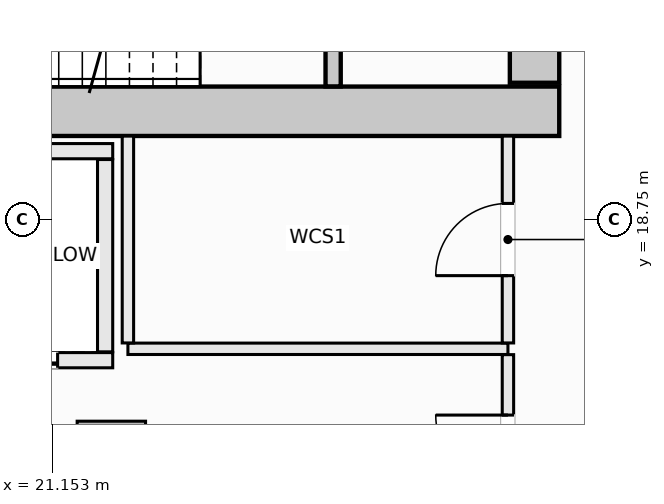
"""IFC4 building model, lengths in metres.
Left out: names, types, materials, properties, quantities, classifications, styles, units other than length and angle.
Written with IfcOpenShell. Run it as: python <this file> out.ifc"""

import sys

from ifc_helpers import new_model, si_unit, direction, frame, frame_2d, origin, origin_2d, place, context, subcontext, project, spatial, rectangle, extrude, element, fill, save


model = new_model("IFC4")
c1 = context("Model", 3, precision=1e-05, world=origin(), true_north=direction((0.0, 1.0)))
c2 = subcontext(c1, "Body", "Model", "MODEL_VIEW")
j1 = project(units=[si_unit("LENGTHUNIT", "METRE"), si_unit("PLANEANGLEUNIT", "RADIAN")], contexts=[c1])
p1 = place(None, origin())
s1 = spatial("IfcSite", under=j1, at=p1, CompositionType="ELEMENT")
p2 = place(p1, origin())
s2 = spatial("IfcBuilding", under=s1, at=p2, CompositionType="ELEMENT")
p3 = place(p2, frame((0.0, 0.0, 166.5)))
s3 = spatial("IfcBuildingStorey", under=s2, at=p3, CompositionType="ELEMENT", Elevation=166.5)
p4 = place(p3, frame((14.175, 20.175, -0.27), z_axis=(0.0, 0.0, 1.0), x_axis=(1.0, 0.0, 0.0)))
e1 = element("IfcWall", 1, at=p4, inside=s3, PredefinedType="SHEAR", context=c2, shape_type="SweptSolid", body=[
    extrude(rectangle(XDim=13.65, YDim=0.65, at=frame_2d((6.825, 0.0))), origin(), (0.0, 0.0, 1.0), 3.4),
])
p5 = place(p3, frame((27.5, 20.55, -0.27), z_axis=(0.0, 0.0, 1.0), x_axis=(0.0, 1.0, 0.0)))
e2 = element("IfcWall", 2, at=p5, inside=s3, PredefinedType="SHEAR", context=c2, shape_type="SweptSolid", body=[
    extrude(rectangle(XDim=1.5, YDim=0.65, at=frame_2d((0.75, 0.0))), origin(), (0.0, 0.0, 1.0), 3.4),
])
p6 = place(p3, frame((21.932, 15.648, -0.27), z_axis=(0.0, 0.0, 1.0), x_axis=(1.0, 0.0, 0.0)))
e3 = element("IfcColumn", 3, at=p6, inside=s3, PredefinedType="COLUMN", context=c2, shape_type="SweptSolid", body=[
    extrude(rectangle(XDim=0.9, YDim=0.9, at=origin_2d()), origin(), (0.0, 0.0, 1.0), 3.4),
])
p7 = place(p3, frame((24.85, 20.502, -0.27), z_axis=(0.0, 0.0, 1.0), x_axis=(0.0, 1.0, 0.0)))
e4 = element("IfcWall", 4, at=p7, inside=s3, PredefinedType="SHEAR", context=c2, shape_type="SweptSolid", body=[
    extrude(rectangle(XDim=3.038, YDim=0.2, at=frame_2d((1.519, 0.0))), origin(), (0.0, 0.0, 1.0), 3.4),
])
p8 = place(p7, frame((0.969, 0.0, 0.27)))
e5 = element("IfcOpeningElement", 5, at=p8, cuts=e4, PredefinedType="OPENING", context=c2, shape_type="SweptSolid", body=[
    extrude(rectangle(XDim=1.1, YDim=2.15, at=frame_2d((0.55, 1.075))), frame((0.0, 0.11, 0.0), z_axis=(0.0, -1.0, 0.0), x_axis=(1.0, 0.0, 0.0)), (0.0, 0.0, 1.0), 0.22),
])
p9 = place(p3, frame((19.4, 19.65, 0.0), z_axis=(0.0, 0.0, 1.0), x_axis=(1.0, 0.0, 0.0)))
e6 = element("IfcWall", 6, at=p9, inside=s3, PredefinedType="SOLIDWALL", context=c2, shape_type="SweptSolid", body=[
    extrude(rectangle(XDim=2.55, YDim=0.2, at=frame_2d((1.275, 0.0))), origin(), (0.0, 0.0, 1.0), 3.13),
])
p10 = place(p3, frame((19.4, 16.9, 0.0), z_axis=(0.0, 0.0, 1.0), x_axis=(1.0, 0.0, 0.0)))
e7 = element("IfcWall", 7, at=p10, inside=s3, PredefinedType="SOLIDWALL", context=c2, shape_type="SweptSolid", body=[
    extrude(rectangle(XDim=2.55, YDim=0.2, at=frame_2d((1.275, 0.0))), origin(), (0.0, 0.0, 1.0), 3.13),
])
p11 = place(p10, frame((0.725, 0.0, 0.0)))
e8 = element("IfcOpeningElement", 8, at=p11, cuts=e7, PredefinedType="OPENING", context=c2, shape_type="SweptSolid", body=[
    extrude(rectangle(XDim=1.1, YDim=2.2, at=frame_2d((0.55, 1.1))), frame((0.0, 0.11, 0.0), z_axis=(0.0, -1.0, 0.0), x_axis=(1.0, 0.0, 0.0)), (0.0, 0.0, 1.0), 0.22),
])
p12 = place(p3, frame((21.85, 17.01, 0.0), z_axis=(0.0, 0.0, 1.0), x_axis=(0.0, 1.0, 0.0)))
e9 = element("IfcWall", 9, at=p12, inside=s3, PredefinedType="SOLIDWALL", context=c2, shape_type="SweptSolid", body=[
    extrude(rectangle(XDim=2.53, YDim=0.2, at=frame_2d((1.265, 0.0))), origin(), (0.0, 0.0, 1.0), 3.13),
])
p13 = place(p3, frame((22.15, 17.05, 0.0), z_axis=(0.0, 0.0, 1.0), x_axis=(1.0, 0.0, 0.0)))
e10 = element("IfcWall", 10, at=p13, inside=s3, PredefinedType="PARTITIONING", context=c2, shape_type="SweptSolid", body=[
    extrude(rectangle(XDim=5.0, YDim=0.15, at=frame_2d((2.5, 0.0))), origin(), (0.0, 0.0, 1.0), 3.13),
])
p14 = place(p3, frame((22.15, 17.127, 0.0), z_axis=(0.0, 0.0, 1.0), x_axis=(0.0, 1.0, 0.0)))
e11 = element("IfcWall", 11, at=p14, inside=s3, PredefinedType="PARTITIONING", context=c2, shape_type="SweptSolid", body=[
    extrude(rectangle(XDim=2.721, YDim=0.15, at=frame_2d((1.36, 0.0))), origin(), (0.0, 0.0, 1.0), 3.13),
])
p15 = place(p3, frame((27.15, 12.056, 0.0), z_axis=(0.0, 0.0, 1.0), x_axis=(0.0, 1.0, 0.0)))
e12 = element("IfcWall", 12, at=p15, inside=s3, PredefinedType="PARTITIONING", context=c2, shape_type="SweptSolid", body=[
    extrude(rectangle(XDim=4.917, YDim=0.15, at=frame_2d((2.458, 0.0))), origin(), (0.0, 0.0, 1.0), 3.13),
])
p16 = place(p15, frame((3.172, 0.0, 0.0)))
e13 = element("IfcOpeningElement", 13, at=p16, cuts=e12, PredefinedType="OPENING", context=c2, shape_type="SweptSolid", body=[
    extrude(rectangle(XDim=0.95, YDim=2.1, at=frame_2d((0.475, 1.05))), frame((0.0, 0.085, 0.0), z_axis=(0.0, -1.0, 0.0), x_axis=(1.0, 0.0, 0.0)), (0.0, 0.0, 1.0), 0.17),
])
p17 = place(p15, frame((1.125, 0.0, 0.0)))
e14 = element("IfcOpeningElement", 14, at=p17, cuts=e12, PredefinedType="OPENING", context=c2, shape_type="SweptSolid", body=[
    extrude(rectangle(XDim=0.95, YDim=2.1, at=frame_2d((0.475, 1.05))), frame((0.0, 0.085, 0.0), z_axis=(0.0, -1.0, 0.0), x_axis=(1.0, 0.0, 0.0)), (0.0, 0.0, 1.0), 0.17),
])
p18 = place(p3, frame((27.15, 17.127, 0.0), z_axis=(0.0, 0.0, 1.0), x_axis=(0.0, 1.0, 0.0)))
e15 = element("IfcWall", 15, at=p18, inside=s3, PredefinedType="PARTITIONING", context=c2, shape_type="SweptSolid", body=[
    extrude(rectangle(XDim=2.721, YDim=0.15, at=frame_2d((1.36, 0.0))), origin(), (0.0, 0.0, 1.0), 3.13),
])
p19 = place(p18, frame((0.885, 0.0, 0.0)))
e16 = element("IfcOpeningElement", 16, at=p19, cuts=e15, PredefinedType="OPENING", context=c2, shape_type="SweptSolid", body=[
    extrude(rectangle(XDim=0.95, YDim=2.1, at=frame_2d((0.475, 1.05))), frame((0.0, 0.085, 0.0), z_axis=(0.0, -1.0, 0.0), x_axis=(1.0, 0.0, 0.0)), (0.0, 0.0, 1.0), 0.17),
])
p20 = place(p11, origin())
e17 = element("IfcDoor", 17, at=p20, inside=s3, OperationType="SLIDING_TO_LEFT", PredefinedType="DOOR", context=c2, shape_type="SweptSolid", body=[
    extrude(rectangle(XDim=1.1, YDim=2.2, at=frame_2d((0.55, 1.1))), frame((0.0, 0.025, 0.0), z_axis=(0.0, -1.0, 0.0), x_axis=(1.0, 0.0, 0.0)), (0.0, 0.0, 1.0), 0.05),
])
fill(e8, e17)
p21 = place(p19, origin())
e18 = element("IfcDoor", 18, at=p21, inside=s3, OperationType="SINGLE_SWING_LEFT", PredefinedType="DOOR", context=c2, shape_type="SweptSolid", body=[
    extrude(rectangle(XDim=0.95, YDim=2.1, at=frame_2d((0.475, 1.05))), frame((0.0, 0.025, 0.0), z_axis=(0.0, -1.0, 0.0), x_axis=(1.0, 0.0, 0.0)), (0.0, 0.0, 1.0), 0.05),
])
fill(e16, e18)
p22 = place(p16, origin())
e19 = element("IfcDoor", 19, at=p22, inside=s3, OperationType="SINGLE_SWING_RIGHT", PredefinedType="DOOR", context=c2, shape_type="SweptSolid", body=[
    extrude(rectangle(XDim=0.95, YDim=2.1, at=frame_2d((0.475, 1.05))), frame((0.0, 0.025, 0.0), z_axis=(0.0, -1.0, 0.0), x_axis=(1.0, 0.0, 0.0)), (0.0, 0.0, 1.0), 0.05),
])
fill(e13, e19)
save(model, sys.argv[1])
